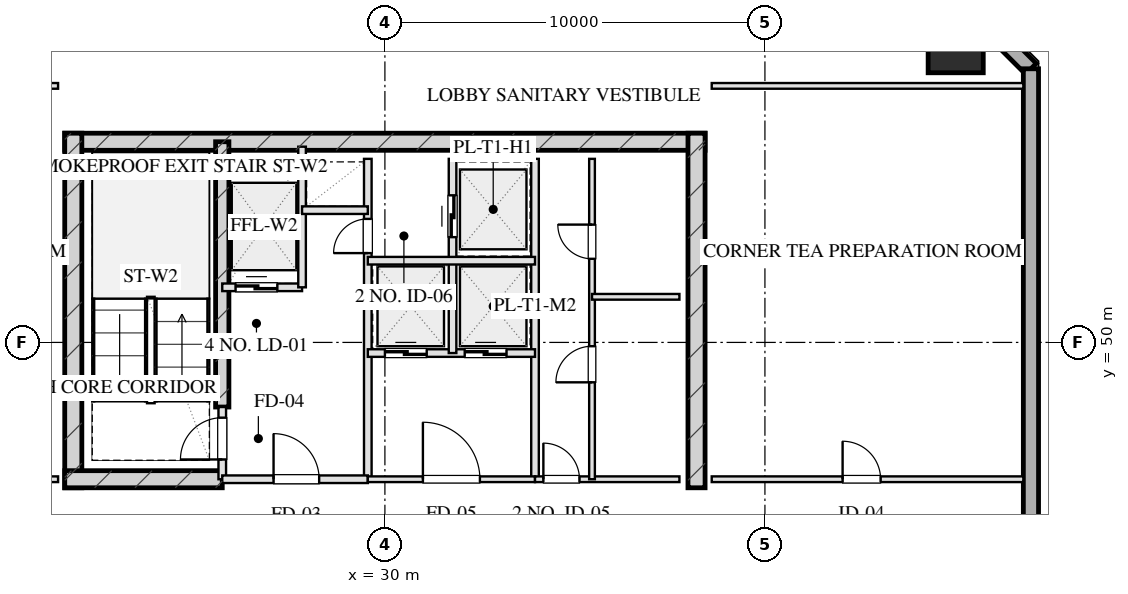
"""IFC4 building model, lengths in metres.
Left out: names, types, materials, properties, quantities, classifications, styles, units other than length and angle.
Written with IfcOpenShell. Run it as: python <this file> out.ifc"""

import sys

from ifc_helpers import new_model, si_unit, direction, frame, frame_2d, origin, origin_2d, place, context, subcontext, project, spatial, rectangle, hollow_rectangle, extrude, element, fill, save


model = new_model("IFC4")
c1 = context("Model", 3, precision=1e-05, world=origin(), true_north=direction((0.0, 1.0)))
c2 = subcontext(c1, "Body", "Model", "MODEL_VIEW")
j1 = project(units=[si_unit("LENGTHUNIT", "METRE"), si_unit("PLANEANGLEUNIT", "RADIAN")], contexts=[c1])
p1 = place(None, origin())
s1 = spatial("IfcSite", under=j1, at=p1, CompositionType="ELEMENT")
p2 = place(p1, origin())
s2 = spatial("IfcBuilding", under=s1, at=p2, CompositionType="ELEMENT")
p3 = place(p2, frame((0.0, 0.0, 212.75)))
s3 = spatial("IfcBuildingStorey", under=s2, at=p3, CompositionType="ELEMENT", Elevation=212.75)
p4 = place(p3, frame((21.575, 55.28, 0.0), z_axis=(0.0, 0.0, 1.0), x_axis=(1.0, 0.0, 0.0)))
e1 = element("IfcWall", 1, at=p4, inside=s3, PredefinedType="SHEAR", context=c2, shape_type="SweptSolid", body=[
    extrude(rectangle(XDim=16.85, YDim=0.45, at=frame_2d((8.425, 0.0))), origin(), (0.0, 0.0, 1.0), 3.45),
])
for number, where, z_axis, x_axis in (
    (2, (21.8, 46.175, 0.0), (0.0, 0.0, 1.0), (0.0, 1.0, 0.0)),
    (3, (38.2, 46.175, 0.0), (0.0, 0.0, 1.0), (0.0, 1.0, 0.0)),
):
    element("IfcWall", number, at=place(p3, frame(where, z_axis=z_axis, x_axis=x_axis)), inside=s3, PredefinedType="SHEAR", context=c2, shape_type="SweptSolid", body=[
        extrude(rectangle(XDim=9.33, YDim=0.45, at=frame_2d((4.665, 0.0))), origin(), (0.0, 0.0, 1.0), 3.45),
    ])
p5 = place(p3, frame((25.72, 48.3, 0.0), z_axis=(0.0, 0.0, 1.0), x_axis=(0.0, 1.0, 0.0)))
e4 = element("IfcWall", 4, at=p5, inside=s3, PredefinedType="SHEAR", context=c2, shape_type="SweptSolid", body=[
    extrude(rectangle(XDim=6.98, YDim=0.35, at=frame_2d((3.49, 0.0))), origin(), (0.0, 0.0, 1.0), 3.45),
])
p6 = place(p3, frame((21.575, 46.4, 0.0), z_axis=(0.0, 0.0, 1.0), x_axis=(1.0, 0.0, 0.0)))
e5 = element("IfcWall", 5, at=p6, inside=s3, PredefinedType="SHEAR", context=c2, shape_type="SweptSolid", body=[
    extrude(rectangle(XDim=4.145, YDim=0.45, at=frame_2d((2.073, 0.0))), origin(), (0.0, 0.0, 1.0), 3.45),
])
p7 = place(p3, frame((45.02, 57.82, 0.0), z_axis=(0.0, 0.0, 1.0), x_axis=(1.0, 0.0, 0.0)))
e6 = element("IfcColumn", 6, at=p7, inside=s3, PredefinedType="COLUMN", context=c2, shape_type="SweptSolid", body=[
    extrude(hollow_rectangle(XDim=1.45, YDim=1.45, WallThickness=0.05, at=origin_2d()), origin(), (0.0, 0.0, 1.0), 3.451),
])
p8 = place(p3, frame((44.4, 59.8, 0.0), z_axis=(0.0, 0.0, 1.0), x_axis=(0.707106781187, -0.707106781187, 0.0)))
e7 = element("IfcWall", 7, at=p8, inside=s3, PredefinedType="SOLIDWALL", context=c2, shape_type="SweptSolid", body=[
    extrude(rectangle(XDim=3.677, YDim=0.4, at=frame_2d((1.838, 0.0))), origin(), (0.0, 0.0, 1.0), 2.55),
])
p9 = place(p3, frame((47.0, 57.2, 0.0), z_axis=(0.0, 0.0, 1.0), x_axis=(0.0, -1.0, 0.0)))
e8 = element("IfcWall", 8, at=p9, inside=s3, PredefinedType="SOLIDWALL", context=c2, shape_type="SweptSolid", body=[
    extrude(rectangle(XDim=46.4, YDim=0.4, at=frame_2d((23.2, 0.0))), origin(), (0.0, 0.0, 1.0), 2.55),
])
p10 = place(p9, frame((28.55, 0.0, 0.75)))
e9 = element("IfcOpeningElement", 9, at=p10, cuts=e8, PredefinedType="OPENING", context=c2, shape_type="SweptSolid", body=[
    extrude(rectangle(XDim=2.1, YDim=1.4, at=frame_2d((1.05, 0.7))), frame((0.0, 0.21, 0.0), z_axis=(0.0, -1.0, 0.0), x_axis=(1.0, 0.0, 0.0)), (0.0, 0.0, 1.0), 0.42),
])
p11 = place(p9, frame((24.75, 0.0, 0.75)))
e10 = element("IfcOpeningElement", 10, at=p11, cuts=e8, PredefinedType="OPENING", context=c2, shape_type="SweptSolid", body=[
    extrude(rectangle(XDim=2.1, YDim=1.4, at=frame_2d((1.05, 0.7))), frame((0.0, 0.21, 0.0), z_axis=(0.0, -1.0, 0.0), x_axis=(1.0, 0.0, 0.0)), (0.0, 0.0, 1.0), 0.42),
])
p12 = place(p9, frame((19.55, 0.0, 0.75)))
e11 = element("IfcOpeningElement", 11, at=p12, cuts=e8, PredefinedType="OPENING", context=c2, shape_type="SweptSolid", body=[
    extrude(rectangle(XDim=2.1, YDim=1.4, at=frame_2d((1.05, 0.7))), frame((0.0, 0.21, 0.0), z_axis=(0.0, -1.0, 0.0), x_axis=(1.0, 0.0, 0.0)), (0.0, 0.0, 1.0), 0.42),
])
p13 = place(p9, frame((15.75, 0.0, 0.75)))
e12 = element("IfcOpeningElement", 12, at=p13, cuts=e8, PredefinedType="OPENING", context=c2, shape_type="SweptSolid", body=[
    extrude(rectangle(XDim=2.1, YDim=1.4, at=frame_2d((1.05, 0.7))), frame((0.0, 0.21, 0.0), z_axis=(0.0, -1.0, 0.0), x_axis=(1.0, 0.0, 0.0)), (0.0, 0.0, 1.0), 0.42),
])
p14 = place(p3, frame((25.72, 46.4, 0.0), z_axis=(0.0, 0.0, 1.0), x_axis=(0.0, 1.0, 0.0)))
e13 = element("IfcWall", 13, at=p14, inside=s3, PredefinedType="PARTITIONING", context=c2, shape_type="SweptSolid", body=[
    extrude(rectangle(XDim=1.9, YDim=0.2, at=frame_2d((0.95, 0.0))), origin(), (0.0, 0.0, 1.0), 3.155),
])
p15 = place(p14, frame((0.52, 0.0, 0.0)))
e14 = element("IfcOpeningElement", 14, at=p15, cuts=e13, PredefinedType="OPENING", context=c2, shape_type="SweptSolid", body=[
    extrude(rectangle(XDim=1.1, YDim=2.05, at=frame_2d((0.55, 1.025))), frame((0.0, 0.11, 0.0), z_axis=(0.0, -1.0, 0.0), x_axis=(1.0, 0.0, 0.0)), (0.0, 0.0, 1.0), 0.22),
])
p16 = place(p3, frame((29.55, 46.4, 0.0), z_axis=(0.0, 0.0, 1.0), x_axis=(0.0, 1.0, 0.0)))
e15 = element("IfcWall", 15, at=p16, inside=s3, PredefinedType="PARTITIONING", context=c2, shape_type="SweptSolid", body=[
    extrude(rectangle(XDim=8.43, YDim=0.2, at=frame_2d((4.215, 0.0))), origin(), (0.0, 0.0, 1.0), 3.155),
])
p17 = place(p16, frame((5.95, 0.0, 0.0)))
e16 = element("IfcOpeningElement", 16, at=p17, cuts=e15, PredefinedType="OPENING", context=c2, shape_type="SweptSolid", body=[
    extrude(rectangle(XDim=0.9, YDim=2.05, at=frame_2d((0.45, 1.025))), frame((0.0, 0.11, 0.0), z_axis=(0.0, -1.0, 0.0), x_axis=(1.0, 0.0, 0.0)), (0.0, 0.0, 1.0), 0.22),
])
p18 = place(p3, frame((25.72, 46.4, 0.0), z_axis=(0.0, 0.0, 1.0), x_axis=(1.0, 0.0, 0.0)))
e17 = element("IfcWall", 17, at=p18, inside=s3, PredefinedType="PARTITIONING", context=c2, shape_type="SweptSolid", body=[
    extrude(rectangle(XDim=3.83, YDim=0.2, at=frame_2d((1.915, 0.0))), origin(), (0.0, 0.0, 1.0), 3.155),
])
p19 = place(p18, frame((1.35, 0.0, 0.0)))
e18 = element("IfcOpeningElement", 18, at=p19, cuts=e17, PredefinedType="OPENING", context=c2, shape_type="SweptSolid", body=[
    extrude(rectangle(XDim=1.2, YDim=2.05, at=frame_2d((0.6, 1.025))), frame((0.0, 0.11, 0.0), z_axis=(0.0, -1.0, 0.0), x_axis=(1.0, 0.0, 0.0)), (0.0, 0.0, 1.0), 0.22),
])
p20 = place(p3, frame((25.72, 51.45, 0.0), z_axis=(0.0, 0.0, 1.0), x_axis=(1.0, 0.0, 0.0)))
e19 = element("IfcWall", 19, at=p20, inside=s3, PredefinedType="PARTITIONING", context=c2, shape_type="SweptSolid", body=[
    extrude(rectangle(XDim=2.1, YDim=0.2, at=frame_2d((1.05, 0.0))), origin(), (0.0, 0.0, 1.0), 3.155),
])
p21 = place(p20, frame((0.35, 0.0, 0.0)))
e20 = element("IfcOpeningElement", 20, at=p21, cuts=e19, PredefinedType="OPENING", context=c2, shape_type="SweptSolid", body=[
    extrude(rectangle(XDim=1.1, YDim=2.05, at=frame_2d((0.55, 1.025))), frame((0.0, 0.11, 0.0), z_axis=(0.0, -1.0, 0.0), x_axis=(1.0, 0.0, 0.0)), (0.0, 0.0, 1.0), 0.22),
])
p22 = place(p3, frame((27.82, 51.45, 0.0), z_axis=(0.0, 0.0, 1.0), x_axis=(0.0, 1.0, 0.0)))
e21 = element("IfcWall", 21, at=p22, inside=s3, PredefinedType="PARTITIONING", context=c2, shape_type="SweptSolid", body=[
    extrude(rectangle(XDim=3.7, YDim=0.2, at=frame_2d((1.85, 0.0))), origin(), (0.0, 0.0, 1.0), 3.155),
])
p23 = place(p3, frame((27.82, 53.48, 0.0), z_axis=(0.0, 0.0, 1.0), x_axis=(1.0, 0.0, 0.0)))
e22 = element("IfcWall", 22, at=p23, inside=s3, PredefinedType="PARTITIONING", context=c2, shape_type="SweptSolid", body=[
    extrude(rectangle(XDim=1.73, YDim=0.2, at=frame_2d((0.865, 0.0))), origin(), (0.0, 0.0, 1.0), 3.155),
])
p24 = place(p3, frame((33.95, 46.4, 0.0), z_axis=(0.0, 0.0, 1.0), x_axis=(0.0, 1.0, 0.0)))
e23 = element("IfcWall", 23, at=p24, inside=s3, PredefinedType="PARTITIONING", context=c2, shape_type="SweptSolid", body=[
    extrude(rectangle(XDim=8.43, YDim=0.2, at=frame_2d((4.215, 0.0))), origin(), (0.0, 0.0, 1.0), 3.155),
])
p25 = place(p3, frame((29.55, 46.4, 0.0), z_axis=(0.0, 0.0, 1.0), x_axis=(1.0, 0.0, 0.0)))
e24 = element("IfcWall", 24, at=p25, inside=s3, PredefinedType="PARTITIONING", context=c2, shape_type="SweptSolid", body=[
    extrude(rectangle(XDim=4.4, YDim=0.15, at=frame_2d((2.2, 0.0))), origin(), (0.0, 0.0, 1.0), 3.155),
])
p26 = place(p25, frame((1.45, 0.0, 0.0)))
e25 = element("IfcOpeningElement", 25, at=p26, cuts=e24, PredefinedType="OPENING", context=c2, shape_type="SweptSolid", body=[
    extrude(rectangle(XDim=1.5, YDim=2.05, at=frame_2d((0.75, 1.025))), frame((0.0, 0.085, 0.0), z_axis=(0.0, -1.0, 0.0), x_axis=(1.0, 0.0, 0.0)), (0.0, 0.0, 1.0), 0.17),
])
p27 = place(p3, frame((29.55, 49.72, 0.0), z_axis=(0.0, 0.0, 1.0), x_axis=(1.0, 0.0, 0.0)))
e26 = element("IfcWall", 26, at=p27, inside=s3, PredefinedType="PARTITIONING", context=c2, shape_type="SweptSolid", body=[
    extrude(rectangle(XDim=4.4, YDim=0.2, at=frame_2d((2.2, 0.0))), origin(), (0.0, 0.0, 1.0), 3.155),
])
p28 = place(p27, frame((0.45, 0.0, 0.0)))
e27 = element("IfcOpeningElement", 27, at=p28, cuts=e26, PredefinedType="OPENING", context=c2, shape_type="SweptSolid", body=[
    extrude(rectangle(XDim=1.1, YDim=2.05, at=frame_2d((0.55, 1.025))), frame((0.0, 0.11, 0.0), z_axis=(0.0, -1.0, 0.0), x_axis=(1.0, 0.0, 0.0)), (0.0, 0.0, 1.0), 0.22),
])
p29 = place(p27, frame((2.55, 0.0, 0.0)))
e28 = element("IfcOpeningElement", 28, at=p29, cuts=e26, PredefinedType="OPENING", context=c2, shape_type="SweptSolid", body=[
    extrude(rectangle(XDim=1.1, YDim=2.05, at=frame_2d((0.55, 1.025))), frame((0.0, 0.11, 0.0), z_axis=(0.0, -1.0, 0.0), x_axis=(1.0, 0.0, 0.0)), (0.0, 0.0, 1.0), 0.22),
])
p30 = place(p3, frame((31.78, 49.72, 0.0), z_axis=(0.0, 0.0, 1.0), x_axis=(0.0, 1.0, 0.0)))
e29 = element("IfcWall", 29, at=p30, inside=s3, PredefinedType="PARTITIONING", context=c2, shape_type="SweptSolid", body=[
    extrude(rectangle(XDim=5.11, YDim=0.2, at=frame_2d((2.555, 0.0))), origin(), (0.0, 0.0, 1.0), 3.155),
])
p31 = place(p30, frame((3.05, 0.0, 0.0)))
e30 = element("IfcOpeningElement", 30, at=p31, cuts=e29, PredefinedType="OPENING", context=c2, shape_type="SweptSolid", body=[
    extrude(rectangle(XDim=1.1, YDim=2.05, at=frame_2d((0.55, 1.025))), frame((0.0, 0.11, 0.0), z_axis=(0.0, -1.0, 0.0), x_axis=(1.0, 0.0, 0.0)), (0.0, 0.0, 1.0), 0.22),
])
p32 = place(p3, frame((29.55, 52.15, 0.0), z_axis=(0.0, 0.0, 1.0), x_axis=(1.0, 0.0, 0.0)))
e31 = element("IfcWall", 31, at=p32, inside=s3, PredefinedType="PARTITIONING", context=c2, shape_type="SweptSolid", body=[
    extrude(rectangle(XDim=4.4, YDim=0.2, at=frame_2d((2.2, 0.0))), origin(), (0.0, 0.0, 1.0), 3.155),
])
p33 = place(p3, frame((33.95, 46.4, 0.0), z_axis=(0.0, 0.0, 1.0), x_axis=(1.0, 0.0, 0.0)))
e32 = element("IfcWall", 32, at=p33, inside=s3, PredefinedType="PARTITIONING", context=c2, shape_type="SweptSolid", body=[
    extrude(rectangle(XDim=3.8, YDim=0.15, at=frame_2d((1.9, 0.0))), origin(), (0.0, 0.0, 1.0), 3.155),
])
p34 = place(p33, frame((0.22, 0.0, 0.0)))
e33 = element("IfcOpeningElement", 33, at=p34, cuts=e32, PredefinedType="OPENING", context=c2, shape_type="SweptSolid", body=[
    extrude(rectangle(XDim=0.95, YDim=2.05, at=frame_2d((0.475, 1.025))), frame((0.0, 0.085, 0.0), z_axis=(0.0, -1.0, 0.0), x_axis=(1.0, 0.0, 0.0)), (0.0, 0.0, 1.0), 0.17),
])
p35 = place(p3, frame((35.45, 46.4, 0.0), z_axis=(0.0, 0.0, 1.0), x_axis=(0.0, 1.0, 0.0)))
e34 = element("IfcWall", 34, at=p35, inside=s3, PredefinedType="PARTITIONING", context=c2, shape_type="SweptSolid", body=[
    extrude(rectangle(XDim=8.43, YDim=0.15, at=frame_2d((4.215, 0.0))), origin(), (0.0, 0.0, 1.0), 2.795),
])
p36 = place(p35, frame((2.55, 0.0, 0.0)))
e35 = element("IfcOpeningElement", 35, at=p36, cuts=e34, PredefinedType="OPENING", context=c2, shape_type="SweptSolid", body=[
    extrude(rectangle(XDim=0.95, YDim=2.05, at=frame_2d((0.475, 1.025))), frame((0.0, 0.085, 0.0), z_axis=(0.0, -1.0, 0.0), x_axis=(1.0, 0.0, 0.0)), (0.0, 0.0, 1.0), 0.17),
])
p37 = place(p35, frame((5.8, 0.0, 0.0)))
e36 = element("IfcOpeningElement", 36, at=p37, cuts=e34, PredefinedType="OPENING", context=c2, shape_type="SweptSolid", body=[
    extrude(rectangle(XDim=0.9, YDim=2.05, at=frame_2d((0.45, 1.025))), frame((0.0, 0.085, 0.0), z_axis=(0.0, -1.0, 0.0), x_axis=(1.0, 0.0, 0.0)), (0.0, 0.0, 1.0), 0.17),
])
p38 = place(p3, frame((35.45, 51.2, 0.0), z_axis=(0.0, 0.0, 1.0), x_axis=(1.0, 0.0, 0.0)))
e37 = element("IfcWall", 37, at=p38, inside=s3, PredefinedType="PARTITIONING", context=c2, shape_type="SweptSolid", body=[
    extrude(rectangle(XDim=2.3, YDim=0.15, at=frame_2d((1.15, 0.0))), origin(), (0.0, 0.0, 1.0), 3.155),
])
p39 = place(p3, frame((13.2, 56.75, 0.0), z_axis=(0.0, 0.0, 1.0), x_axis=(1.0, 0.0, 0.0)))
e38 = element("IfcWall", 38, at=p39, inside=s3, PredefinedType="PARTITIONING", context=c2, shape_type="SweptSolid", body=[
    extrude(rectangle(XDim=8.2, YDim=0.15, at=frame_2d((4.1, 0.0))), origin(), (0.0, 0.0, 1.0), 3.155),
])
p40 = place(p3, frame((13.2, 46.4, 0.0), z_axis=(0.0, 0.0, 1.0), x_axis=(1.0, 0.0, 0.0)))
e39 = element("IfcWall", 39, at=p40, inside=s3, PredefinedType="PARTITIONING", context=c2, shape_type="SweptSolid", body=[
    extrude(rectangle(XDim=8.2, YDim=0.15, at=frame_2d((4.1, 0.0))), origin(), (0.0, 0.0, 1.0), 3.155),
])
p41 = place(p40, frame((3.444, 0.0, 0.0)))
e40 = element("IfcOpeningElement", 40, at=p41, cuts=e39, PredefinedType="OPENING", context=c2, shape_type="SweptSolid", body=[
    extrude(rectangle(XDim=1.0, YDim=2.05, at=frame_2d((0.5, 1.025))), frame((0.0, 0.085, 0.0), z_axis=(0.0, -1.0, 0.0), x_axis=(1.0, 0.0, 0.0)), (0.0, 0.0, 1.0), 0.17),
])
p42 = place(p3, frame((38.6, 56.75, 0.0), z_axis=(0.0, 0.0, 1.0), x_axis=(1.0, 0.0, 0.0)))
e41 = element("IfcWall", 41, at=p42, inside=s3, PredefinedType="PARTITIONING", context=c2, shape_type="SweptSolid", body=[
    extrude(rectangle(XDim=8.2, YDim=0.15, at=frame_2d((4.1, 0.0))), origin(), (0.0, 0.0, 1.0), 3.155),
])
p43 = place(p3, frame((38.6, 46.4, 0.0), z_axis=(0.0, 0.0, 1.0), x_axis=(1.0, 0.0, 0.0)))
e42 = element("IfcWall", 42, at=p43, inside=s3, PredefinedType="PARTITIONING", context=c2, shape_type="SweptSolid", body=[
    extrude(rectangle(XDim=8.2, YDim=0.15, at=frame_2d((4.1, 0.0))), origin(), (0.0, 0.0, 1.0), 3.155),
])
p44 = place(p43, frame((3.444, 0.0, 0.0)))
e43 = element("IfcOpeningElement", 43, at=p44, cuts=e42, PredefinedType="OPENING", context=c2, shape_type="SweptSolid", body=[
    extrude(rectangle(XDim=1.0, YDim=2.05, at=frame_2d((0.5, 1.025))), frame((0.0, 0.085, 0.0), z_axis=(0.0, -1.0, 0.0), x_axis=(1.0, 0.0, 0.0)), (0.0, 0.0, 1.0), 0.17),
])
p45 = place(p15, origin())
e44 = element("IfcDoor", 44, at=p45, inside=s3, OperationType="SINGLE_SWING_LEFT", PredefinedType="DOOR", context=c2, shape_type="SweptSolid", body=[
    extrude(rectangle(XDim=1.1, YDim=2.05, at=frame_2d((0.55, 1.025))), frame((0.0, 0.025, 0.0), z_axis=(0.0, -1.0, 0.0), x_axis=(1.0, 0.0, 0.0)), (0.0, 0.0, 1.0), 0.05),
])
fill(e14, e44)
p46 = place(p17, origin())
e45 = element("IfcDoor", 45, at=p46, inside=s3, OperationType="SINGLE_SWING_LEFT", PredefinedType="DOOR", context=c2, shape_type="SweptSolid", body=[
    extrude(rectangle(XDim=0.9, YDim=2.05, at=frame_2d((0.45, 1.025))), frame((0.0, 0.025, 0.0), z_axis=(0.0, -1.0, 0.0), x_axis=(1.0, 0.0, 0.0)), (0.0, 0.0, 1.0), 0.05),
])
fill(e16, e45)
p47 = place(p19, origin())
e46 = element("IfcDoor", 46, at=p47, inside=s3, OperationType="SINGLE_SWING_LEFT", PredefinedType="DOOR", context=c2, shape_type="SweptSolid", body=[
    extrude(rectangle(XDim=1.2, YDim=2.05, at=frame_2d((0.6, 1.025))), frame((0.0, 0.025, 0.0), z_axis=(0.0, -1.0, 0.0), x_axis=(1.0, 0.0, 0.0)), (0.0, 0.0, 1.0), 0.05),
])
fill(e18, e46)
p48 = place(p21, origin())
e47 = element("IfcDoor", 47, at=p48, inside=s3, OperationType="DOUBLE_DOOR_SLIDING", PredefinedType="DOOR", context=c2, shape_type="SweptSolid", body=[
    extrude(rectangle(XDim=1.1, YDim=2.05, at=frame_2d((0.55, 1.025))), frame((0.0, 0.025, 0.0), z_axis=(0.0, -1.0, 0.0), x_axis=(1.0, 0.0, 0.0)), (0.0, 0.0, 1.0), 0.05),
])
fill(e20, e47)
p49 = place(p26, origin())
e48 = element("IfcDoor", 48, at=p49, inside=s3, OperationType="SINGLE_SWING_LEFT", PredefinedType="DOOR", context=c2, shape_type="SweptSolid", body=[
    extrude(rectangle(XDim=1.5, YDim=2.05, at=frame_2d((0.75, 1.025))), frame((0.0, 0.025, 0.0), z_axis=(0.0, -1.0, 0.0), x_axis=(1.0, 0.0, 0.0)), (0.0, 0.0, 1.0), 0.05),
])
fill(e25, e48)
p50 = place(p28, origin())
e49 = element("IfcDoor", 49, at=p50, inside=s3, OperationType="DOUBLE_DOOR_SLIDING", PredefinedType="DOOR", context=c2, shape_type="SweptSolid", body=[
    extrude(rectangle(XDim=1.1, YDim=2.05, at=frame_2d((0.55, 1.025))), frame((0.0, 0.025, 0.0), z_axis=(0.0, -1.0, 0.0), x_axis=(1.0, 0.0, 0.0)), (0.0, 0.0, 1.0), 0.05),
])
fill(e27, e49)
p51 = place(p29, origin())
e50 = element("IfcDoor", 50, at=p51, inside=s3, OperationType="DOUBLE_DOOR_SLIDING", PredefinedType="DOOR", context=c2, shape_type="SweptSolid", body=[
    extrude(rectangle(XDim=1.1, YDim=2.05, at=frame_2d((0.55, 1.025))), frame((0.0, 0.025, 0.0), z_axis=(0.0, -1.0, 0.0), x_axis=(1.0, 0.0, 0.0)), (0.0, 0.0, 1.0), 0.05),
])
fill(e28, e50)
p52 = place(p31, origin())
e51 = element("IfcDoor", 51, at=p52, inside=s3, OperationType="DOUBLE_DOOR_SLIDING", PredefinedType="DOOR", context=c2, shape_type="SweptSolid", body=[
    extrude(rectangle(XDim=1.1, YDim=2.05, at=frame_2d((0.55, 1.025))), frame((0.0, 0.025, 0.0), z_axis=(0.0, -1.0, 0.0), x_axis=(1.0, 0.0, 0.0)), (0.0, 0.0, 1.0), 0.05),
])
fill(e30, e51)
p53 = place(p34, origin())
e52 = element("IfcDoor", 52, at=p53, inside=s3, OperationType="SINGLE_SWING_LEFT", PredefinedType="DOOR", context=c2, shape_type="SweptSolid", body=[
    extrude(rectangle(XDim=0.95, YDim=2.05, at=frame_2d((0.475, 1.025))), frame((0.0, 0.025, 0.0), z_axis=(0.0, -1.0, 0.0), x_axis=(1.0, 0.0, 0.0)), (0.0, 0.0, 1.0), 0.05),
])
fill(e33, e52)
p54 = place(p36, origin())
e53 = element("IfcDoor", 53, at=p54, inside=s3, OperationType="SINGLE_SWING_LEFT", PredefinedType="DOOR", context=c2, shape_type="SweptSolid", body=[
    extrude(rectangle(XDim=0.95, YDim=2.05, at=frame_2d((0.475, 1.025))), frame((0.0, 0.025, 0.0), z_axis=(0.0, -1.0, 0.0), x_axis=(1.0, 0.0, 0.0)), (0.0, 0.0, 1.0), 0.05),
])
fill(e35, e53)
p55 = place(p37, origin())
e54 = element("IfcDoor", 54, at=p55, inside=s3, OperationType="SINGLE_SWING_RIGHT", PredefinedType="DOOR", context=c2, shape_type="SweptSolid", body=[
    extrude(rectangle(XDim=0.9, YDim=2.05, at=frame_2d((0.45, 1.025))), frame((0.0, 0.025, 0.0), z_axis=(0.0, -1.0, 0.0), x_axis=(1.0, 0.0, 0.0)), (0.0, 0.0, 1.0), 0.05),
])
fill(e36, e54)
p56 = place(p44, origin())
e55 = element("IfcDoor", 55, at=p56, inside=s3, OperationType="SINGLE_SWING_LEFT", PredefinedType="DOOR", context=c2, shape_type="SweptSolid", body=[
    extrude(rectangle(XDim=1.0, YDim=2.05, at=frame_2d((0.5, 1.025))), frame((0.0, 0.025, 0.0), z_axis=(0.0, -1.0, 0.0), x_axis=(1.0, 0.0, 0.0)), (0.0, 0.0, 1.0), 0.05),
])
fill(e43, e55)
save(model, sys.argv[1])
